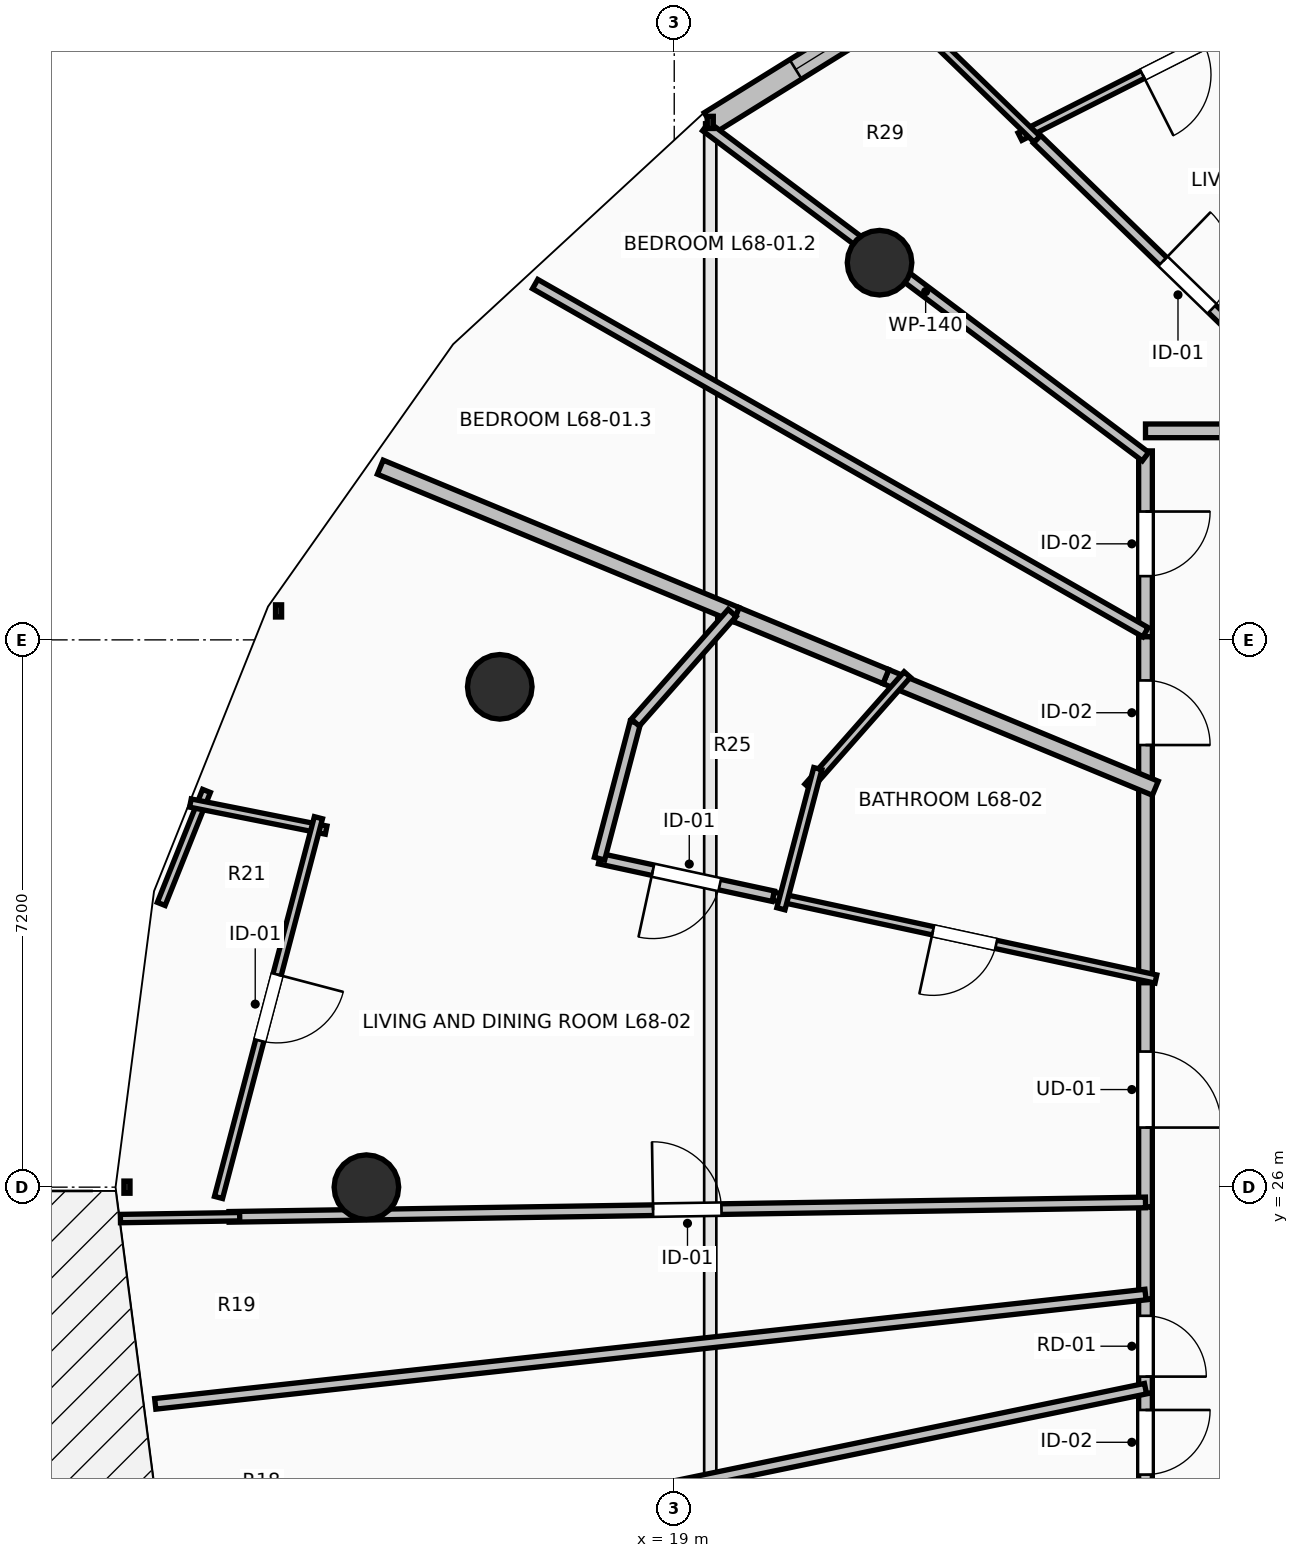
"""IFC4 building model, lengths in metres.
Left out: names, types, materials, properties, quantities, classifications, styles, units other than length and angle.
Written with IfcOpenShell. Run it as: python <this file> out.ifc"""

import sys

from ifc_helpers import new_model, si_unit, direction, frame, frame_2d, origin, origin_2d, place, context, subcontext, project, spatial, rectangle, circle, extrude, element, fill, save


model = new_model("IFC4")
c1 = context("Model", 3, precision=1e-05, world=origin(), true_north=direction((0.0, 1.0)))
c2 = subcontext(c1, "Body", "Model", "MODEL_VIEW")
j1 = project(units=[si_unit("LENGTHUNIT", "METRE"), si_unit("PLANEANGLEUNIT", "RADIAN")], contexts=[c1])
p1 = place(None, origin())
s1 = spatial("IfcSite", under=j1, at=p1, CompositionType="ELEMENT")
p2 = place(p1, origin())
s2 = spatial("IfcBuilding", under=s1, at=p2, CompositionType="ELEMENT")
p3 = place(p2, frame((0.0, 0.0, 252.0)))
s3 = spatial("IfcBuildingStorey", under=s2, at=p3, CompositionType="ELEMENT", Elevation=252.0)
for number, where, z_axis, x_axis in (
    (1, (21.701, 38.162, 0.0), (0.0, 0.0, 1.0), (-0.707, 0.707, 0.0)),
    (2, (16.705, 32.582, 0.0), (0.0, 0.0, 1.0), (-0.924, 0.383, 0.0)),
    (3, (14.95, 26.0, 0.0), (0.0, 0.0, 1.0), (-1.0, 0.0, 0.0)),
):
    element("IfcColumn", number, at=place(p3, frame(where, z_axis=z_axis, x_axis=x_axis)), inside=s3, PredefinedType="COLUMN", context=c2, shape_type="SweptSolid", body=[
        extrude(circle(Radius=0.425, at=origin_2d()), origin(), (0.0, 0.0, 1.0), 3.55),
    ])
p4 = place(p3, frame((23.444, 42.471, 0.0), z_axis=(0.0, 0.0, 1.0), x_axis=(-0.849702323036, -0.527262707032, 0.0)))
e4 = element("IfcWall", 4, at=p4, inside=s3, PredefinedType="STANDARD", context=c2, shape_type="SweptSolid", body=[
    extrude(rectangle(XDim=4.672, YDim=0.3, at=frame_2d((2.336, 0.0))), origin(), (0.0, 0.0, 1.0), 3.29),
])
p5 = place(p4, frame((2.15, 0.0, 0.85)))
e5 = element("IfcOpeningElement", 5, at=p5, cuts=e4, PredefinedType="OPENING", context=c2, shape_type="SweptSolid", body=[
    extrude(rectangle(XDim=1.2, YDim=1.95, at=frame_2d((0.6, 0.975))), frame((0.0, 0.165, 0.0), z_axis=(0.0, -1.0, 0.0), x_axis=(1.0, 0.0, 0.0)), (0.0, 0.0, 1.0), 0.33),
])
p6 = place(p3, frame((27.646, 35.95, 0.0), z_axis=(0.0, 0.0, 1.0), x_axis=(-1.0, 0.0, 0.0)))
e6 = element("IfcWall", 6, at=p6, inside=s3, PredefinedType="PARTITIONING", context=c2, shape_type="SweptSolid", body=[
    extrude(rectangle(XDim=2.446, YDim=0.18, at=frame_2d((1.223, 0.0))), origin(), (0.0, 0.0, 1.0), 2.482),
])
p7 = place(p3, frame((25.2, 35.686, 0.0), z_axis=(0.0, 0.0, 1.0), x_axis=(0.0, -1.0, 0.0)))
e7 = element("IfcWall", 7, at=p7, inside=s3, PredefinedType="PARTITIONING", context=c2, shape_type="SweptSolid", body=[
    extrude(rectangle(XDim=2.445, YDim=0.18, at=frame_2d((1.223, 0.0))), origin(), (0.0, 0.0, 1.0), 2.482),
])
p8 = place(p7, frame((0.798, 0.0, 0.0)))
e8 = element("IfcOpeningElement", 8, at=p8, cuts=e7, PredefinedType="OPENING", context=c2, shape_type="SweptSolid", body=[
    extrude(rectangle(XDim=0.85, YDim=2.1, at=frame_2d((0.425, 1.05))), frame((0.0, 0.105, 0.0), z_axis=(0.0, -1.0, 0.0), x_axis=(1.0, 0.0, 0.0)), (0.0, 0.0, 1.0), 0.21),
])
p9 = place(p3, frame((25.2, 33.241, 0.0), z_axis=(0.0, 0.0, 1.0), x_axis=(0.0, -1.0, 0.0)))
e9 = element("IfcWall", 9, at=p9, inside=s3, PredefinedType="PARTITIONING", context=c2, shape_type="SweptSolid", body=[
    extrude(rectangle(XDim=1.999, YDim=0.18, at=frame_2d((1.0, 0.0))), origin(), (0.0, 0.0, 1.0), 3.022),
])
p10 = place(p9, frame((0.574, 0.0, 0.0)))
e10 = element("IfcOpeningElement", 10, at=p10, cuts=e9, PredefinedType="OPENING", context=c2, shape_type="SweptSolid", body=[
    extrude(rectangle(XDim=0.85, YDim=2.1, at=frame_2d((0.425, 1.05))), frame((0.0, 0.105, 0.0), z_axis=(0.0, -1.0, 0.0), x_axis=(1.0, 0.0, 0.0)), (0.0, 0.0, 1.0), 0.21),
])
p11 = place(p3, frame((25.2, 28.829, 0.0), z_axis=(0.0, 0.0, 1.0), x_axis=(0.0, -1.0, 0.0)))
e11 = element("IfcWall", 11, at=p11, inside=s3, PredefinedType="PARTITIONING", context=c2, shape_type="SweptSolid", body=[
    extrude(rectangle(XDim=3.09, YDim=0.18, at=frame_2d((1.545, 0.0))), origin(), (0.0, 0.0, 1.0), 2.482),
])
p12 = place(p11, frame((1.045, 0.0, 0.0)))
e12 = element("IfcOpeningElement", 12, at=p12, cuts=e11, PredefinedType="OPENING", context=c2, shape_type="SweptSolid", body=[
    extrude(rectangle(XDim=1.0, YDim=2.15, at=frame_2d((0.5, 1.075))), frame((0.0, 0.105, 0.0), z_axis=(0.0, -1.0, 0.0), x_axis=(1.0, 0.0, 0.0)), (0.0, 0.0, 1.0), 0.21),
])
p13 = place(p3, frame((25.2, 31.382, 0.0), z_axis=(0.0, 0.0, 1.0), x_axis=(0.0, -1.0, 0.0)))
e13 = element("IfcWall", 13, at=p13, inside=s3, PredefinedType="PARTITIONING", context=c2, shape_type="SweptSolid", body=[
    extrude(rectangle(XDim=2.693, YDim=0.18, at=frame_2d((1.347, 0.0))), origin(), (0.0, 0.0, 1.0), 2.482),
])
p14 = place(p3, frame((25.2, 25.739, 0.0), z_axis=(0.0, 0.0, 1.0), x_axis=(0.0, -1.0, 0.0)))
e14 = element("IfcWall", 14, at=p14, inside=s3, PredefinedType="PARTITIONING", context=c2, shape_type="SweptSolid", body=[
    extrude(rectangle(XDim=1.212, YDim=0.18, at=frame_2d((0.606, 0.0))), origin(), (0.0, 0.0, 1.0), 3.29),
])
p15 = place(p3, frame((25.2, 24.527, 0.0), z_axis=(0.0, 0.0, 1.0), x_axis=(0.0, -1.0, 0.0)))
e15 = element("IfcWall", 15, at=p15, inside=s3, PredefinedType="PARTITIONING", context=c2, shape_type="SweptSolid", body=[
    extrude(rectangle(XDim=1.239, YDim=0.18, at=frame_2d((0.62, 0.0))), origin(), (0.0, 0.0, 1.0), 3.29),
])
p16 = place(p15, frame((0.219, 0.0, 0.0)))
e16 = element("IfcOpeningElement", 16, at=p16, cuts=e15, PredefinedType="OPENING", context=c2, shape_type="SweptSolid", body=[
    extrude(rectangle(XDim=0.8, YDim=2.05, at=frame_2d((0.4, 1.025))), frame((0.0, 0.105, 0.0), z_axis=(0.0, -1.0, 0.0), x_axis=(1.0, 0.0, 0.0)), (0.0, 0.0, 1.0), 0.21),
])
p17 = place(p3, frame((25.2, 23.288, 0.0), z_axis=(0.0, 0.0, 1.0), x_axis=(0.0, -1.0, 0.0)))
e17 = element("IfcWall", 17, at=p17, inside=s3, PredefinedType="PARTITIONING", context=c2, shape_type="SweptSolid", body=[
    extrude(rectangle(XDim=1.289, YDim=0.18, at=frame_2d((0.645, 0.0))), origin(), (0.0, 0.0, 1.0), 3.29),
])
p18 = place(p17, frame((0.219, 0.0, 0.0)))
e18 = element("IfcOpeningElement", 18, at=p18, cuts=e17, PredefinedType="OPENING", context=c2, shape_type="SweptSolid", body=[
    extrude(rectangle(XDim=0.85, YDim=2.1, at=frame_2d((0.425, 1.05))), frame((0.0, 0.105, 0.0), z_axis=(0.0, -1.0, 0.0), x_axis=(1.0, 0.0, 0.0)), (0.0, 0.0, 1.0), 0.21),
])
p19 = place(p3, frame((27.579, 41.858, 0.0), z_axis=(0.0, 0.0, 1.0), x_axis=(-0.892472689139, -0.451101428883, 0.0)))
e19 = element("IfcWall", 19, at=p19, inside=s3, PredefinedType="PARTITIONING", context=c2, shape_type="SweptSolid", body=[
    extrude(rectangle(XDim=4.516, YDim=0.11, at=frame_2d((2.258, 0.0))), origin(), (0.0, 0.0, 1.0), 3.29),
])
p20 = place(p19, frame((1.808, 0.0, 0.0)))
e20 = element("IfcOpeningElement", 20, at=p20, cuts=e19, PredefinedType="OPENING", context=c2, shape_type="SweptSolid", body=[
    extrude(rectangle(XDim=0.9, YDim=2.1, at=frame_2d((0.45, 1.05))), frame((0.0, 0.07, 0.0), z_axis=(0.0, -1.0, 0.0), x_axis=(1.0, 0.0, 0.0)), (0.0, 0.0, 1.0), 0.14),
])
p21 = place(p3, frame((23.773, 39.787, 0.0), z_axis=(0.0, 0.0, 1.0), x_axis=(-0.718131661866, 0.695907261225, 0.0)))
e21 = element("IfcWall", 21, at=p21, inside=s3, PredefinedType="PARTITIONING", context=c2, shape_type="SweptSolid", body=[
    extrude(rectangle(XDim=2.669, YDim=0.11, at=frame_2d((1.335, 0.0))), origin(), (0.0, 0.0, 1.0), 3.29),
])
p22 = place(p3, frame((23.773, 39.787, 0.0), z_axis=(0.0, 0.0, 1.0), x_axis=(0.718070058765, -0.695970826045, 0.0)))
e22 = element("IfcWall", 22, at=p22, inside=s3, PredefinedType="PARTITIONING", context=c2, shape_type="SweptSolid", body=[
    extrude(rectangle(XDim=5.513, YDim=0.14, at=frame_2d((2.756, 0.0))), origin(), (0.0, 0.0, 1.0), 2.482),
])
p23 = place(p22, frame((2.306, 0.0, 0.0)))
e23 = element("IfcOpeningElement", 23, at=p23, cuts=e22, PredefinedType="OPENING", context=c2, shape_type="SweptSolid", body=[
    extrude(rectangle(XDim=0.9, YDim=2.1, at=frame_2d((0.45, 1.05))), frame((0.0, 0.085, 0.0), z_axis=(0.0, -1.0, 0.0), x_axis=(1.0, 0.0, 0.0)), (0.0, 0.0, 1.0), 0.17),
])
p24 = place(p3, frame((19.415, 39.954, 0.0), z_axis=(0.0, 0.0, 1.0), x_axis=(0.799712355931, -0.600383334022, 0.0)))
e24 = element("IfcWall", 24, at=p24, inside=s3, PredefinedType="PARTITIONING", context=c2, shape_type="SweptSolid", body=[
    extrude(rectangle(XDim=7.234, YDim=0.14, at=frame_2d((3.617, 0.0))), origin(), (0.0, 0.0, 1.0), 2.482),
])
p25 = place(p3, frame((17.17, 37.881, 0.0), z_axis=(0.0, 0.0, 1.0), x_axis=(0.868639415668, -0.495444815844, 0.0)))
e25 = element("IfcWall", 25, at=p25, inside=s3, PredefinedType="PARTITIONING", context=c2, shape_type="SweptSolid", body=[
    extrude(rectangle(XDim=9.244, YDim=0.14, at=frame_2d((4.622, 0.0))), origin(), (0.0, 0.0, 1.0), 2.874),
])
p26 = place(p3, frame((15.133, 35.472, 0.0), z_axis=(0.0, 0.0, 1.0), x_axis=(0.923891232285, -0.382655185392, 0.0)))
e26 = element("IfcWall", 26, at=p26, inside=s3, PredefinedType="PARTITIONING", context=c2, shape_type="SweptSolid", body=[
    extrude(rectangle(XDim=5.07, YDim=0.2, at=frame_2d((2.535, 0.0))), origin(), (0.0, 0.0, 1.0), 2.874),
])
p27 = place(p3, frame((21.785, 32.717, 0.0), z_axis=(0.0, 0.0, 1.0), x_axis=(0.923878783617, -0.382685240352, 0.0)))
e27 = element("IfcWall", 27, at=p27, inside=s3, PredefinedType="PARTITIONING", context=c2, shape_type="SweptSolid", body=[
    extrude(rectangle(XDim=3.837, YDim=0.2, at=frame_2d((1.918, 0.0))), origin(), (0.0, 0.0, 1.0), 2.972),
])
p28 = place(p3, frame((19.817, 33.532, 0.0), z_axis=(0.0, 0.0, 1.0), x_axis=(0.92391905869, -0.382587993786, 0.0)))
e28 = element("IfcWall", 28, at=p28, inside=s3, PredefinedType="PARTITIONING", context=c2, shape_type="SweptSolid", body=[
    extrude(rectangle(XDim=2.13, YDim=0.2, at=frame_2d((1.065, 0.0))), origin(), (0.0, 0.0, 1.0), 2.972),
])
p29 = place(p3, frame((25.337, 28.738, 0.0), z_axis=(0.0, 0.0, 1.0), x_axis=(-0.977382932841, 0.211477191656, 0.0)))
e29 = element("IfcWall", 29, at=p29, inside=s3, PredefinedType="PARTITIONING", context=c2, shape_type="SweptSolid", body=[
    extrude(rectangle(XDim=5.151, YDim=0.11, at=frame_2d((2.576, 0.0))), origin(), (0.0, 0.0, 1.0), 2.482),
])
p30 = place(p29, frame((2.15, 0.0, 0.0)))
e30 = element("IfcOpeningElement", 30, at=p30, cuts=e29, PredefinedType="OPENING", context=c2, shape_type="SweptSolid", body=[
    extrude(rectangle(XDim=0.85, YDim=2.1, at=frame_2d((0.425, 1.05))), frame((0.0, 0.07, 0.0), z_axis=(0.0, -1.0, 0.0), x_axis=(1.0, 0.0, 0.0)), (0.0, 0.0, 1.0), 0.14),
])
p31 = place(p3, frame((12.846, 31.213, 0.0), z_axis=(0.0, 0.0, 1.0), x_axis=(-0.371522095559, -0.928424112414, 0.0)))
e31 = element("IfcWall", 31, at=p31, inside=s3, PredefinedType="PARTITIONING", context=c2, shape_type="SweptSolid", body=[
    extrude(rectangle(XDim=1.602, YDim=0.11, at=frame_2d((0.801, 0.0))), origin(), (0.0, 0.0, 1.0), 3.29),
])
p32 = place(p3, frame((12.635, 31.053, 0.0), z_axis=(0.0, 0.0, 1.0), x_axis=(0.980704252003, -0.195497238094, 0.0)))
e32 = element("IfcWall", 32, at=p32, inside=s3, PredefinedType="PARTITIONING", context=c2, shape_type="SweptSolid", body=[
    extrude(rectangle(XDim=1.821, YDim=0.11, at=frame_2d((0.91, 0.0))), origin(), (0.0, 0.0, 1.0), 3.29),
])
p33 = place(p3, frame((14.319, 30.86, 0.0), z_axis=(0.0, 0.0, 1.0), x_axis=(-0.254404898477, -0.967097796312, 0.0)))
e33 = element("IfcWall", 33, at=p33, inside=s3, PredefinedType="PARTITIONING", context=c2, shape_type="SweptSolid", body=[
    extrude(rectangle(XDim=5.166, YDim=0.11, at=frame_2d((2.583, 0.0))), origin(), (0.0, 0.0, 1.0), 3.29),
])
p34 = place(p33, frame((2.133, 0.0, 0.0)))
e34 = element("IfcOpeningElement", 34, at=p34, cuts=e33, PredefinedType="OPENING", context=c2, shape_type="SweptSolid", body=[
    extrude(rectangle(XDim=0.9, YDim=2.1, at=frame_2d((0.45, 1.05))), frame((0.0, 0.07, 0.0), z_axis=(0.0, -1.0, 0.0), x_axis=(1.0, 0.0, 0.0)), (0.0, 0.0, 1.0), 0.14),
])
p35 = place(p3, frame((20.302, 29.828, 0.0), z_axis=(0.0, 0.0, 1.0), x_axis=(-0.977387924942, 0.211454118377, 0.0)))
e35 = element("IfcWall", 35, at=p35, inside=s3, PredefinedType="PARTITIONING", context=c2, shape_type="SweptSolid", body=[
    extrude(rectangle(XDim=2.338, YDim=0.14, at=frame_2d((1.169, 0.0))), origin(), (0.0, 0.0, 1.0), 2.972),
])
p36 = place(p35, frame((0.719, 0.0, 0.0)))
e36 = element("IfcOpeningElement", 36, at=p36, cuts=e35, PredefinedType="OPENING", context=c2, shape_type="SweptSolid", body=[
    extrude(rectangle(XDim=0.9, YDim=2.1, at=frame_2d((0.45, 1.05))), frame((0.0, 0.085, 0.0), z_axis=(0.0, -1.0, 0.0), x_axis=(1.0, 0.0, 0.0)), (0.0, 0.0, 1.0), 0.17),
])
p37 = place(p3, frame((18.017, 30.322, 0.0), z_axis=(0.0, 0.0, 1.0), x_axis=(0.254434866485, 0.967089912426, 0.0)))
e37 = element("IfcWall", 37, at=p37, inside=s3, PredefinedType="PARTITIONING", context=c2, shape_type="SweptSolid", body=[
    extrude(rectangle(XDim=1.851, YDim=0.14, at=frame_2d((0.926, 0.0))), origin(), (0.0, 0.0, 1.0), 2.482),
])
p38 = place(p3, frame((18.488, 32.112, 0.0), z_axis=(0.0, 0.0, 1.0), x_axis=(0.661856531983, 0.749630529709, 0.0)))
e38 = element("IfcWall", 38, at=p38, inside=s3, PredefinedType="PARTITIONING", context=c2, shape_type="SweptSolid", body=[
    extrude(rectangle(XDim=1.925, YDim=0.14, at=frame_2d((0.962, 0.0))), origin(), (0.0, 0.0, 1.0), 2.482),
])
p39 = place(p3, frame((13.143, 25.609, 0.0), z_axis=(0.0, 0.0, 1.0), x_axis=(0.999875613351, 0.015772058374, 0.0)))
e39 = element("IfcWall", 39, at=p39, inside=s3, PredefinedType="PARTITIONING", context=c2, shape_type="SweptSolid", body=[
    extrude(rectangle(XDim=12.058, YDim=0.14, at=frame_2d((6.029, 0.0))), origin(), (0.0, 0.0, 1.0), 2.874),
])
p40 = place(p39, frame((5.579, 0.0, 0.0)))
e40 = element("IfcOpeningElement", 40, at=p40, cuts=e39, PredefinedType="OPENING", context=c2, shape_type="SweptSolid", body=[
    extrude(rectangle(XDim=0.9, YDim=2.1, at=frame_2d((0.45, 1.05))), frame((0.0, 0.085, 0.0), z_axis=(0.0, -1.0, 0.0), x_axis=(1.0, 0.0, 0.0)), (0.0, 0.0, 1.0), 0.17),
])
p41 = place(p3, frame((22.066, 32.744, 0.0), z_axis=(0.0, 0.0, 1.0), x_axis=(-0.662047420969, -0.749461948593, 0.0)))
e41 = element("IfcWall", 41, at=p41, inside=s3, PredefinedType="PARTITIONING", context=c2, shape_type="SweptSolid", body=[
    extrude(rectangle(XDim=1.972, YDim=0.11, at=frame_2d((0.986, 0.0))), origin(), (0.0, 0.0, 1.0), 2.972),
])
p42 = place(p3, frame((20.889, 31.506, 0.0), z_axis=(0.0, 0.0, 1.0), x_axis=(-0.254568935897, -0.967054629727, 0.0)))
e42 = element("IfcWall", 42, at=p42, inside=s3, PredefinedType="PARTITIONING", context=c2, shape_type="SweptSolid", body=[
    extrude(rectangle(XDim=1.906, YDim=0.11, at=frame_2d((0.953, 0.0))), origin(), (0.0, 0.0, 1.0), 2.482),
])
p43 = place(p3, frame((11.714, 25.587, 0.0), z_axis=(0.0, 0.0, 1.0), x_axis=(0.9998813462, 0.015404334465, 0.0)))
e43 = element("IfcWall", 43, at=p43, inside=s3, PredefinedType="PARTITIONING", context=c2, shape_type="SweptSolid", body=[
    extrude(rectangle(XDim=1.569, YDim=0.11, at=frame_2d((0.785, 0.0))), origin(), (0.0, 0.0, 1.0), 3.29),
])
p44 = place(p3, frame((12.172, 23.149, 0.0), z_axis=(0.0, 0.0, 1.0), x_axis=(0.993963433103, 0.109711866515, 0.0)))
e44 = element("IfcWall", 44, at=p44, inside=s3, PredefinedType="PARTITIONING", context=c2, shape_type="SweptSolid", body=[
    extrude(rectangle(XDim=13.107, YDim=0.14, at=frame_2d((6.553, 0.0))), origin(), (0.0, 0.0, 1.0), 2.874),
])
p45 = place(p3, frame((12.845, 20.791, 0.0), z_axis=(0.0, 0.0, 1.0), x_axis=(0.97923049011, 0.202750208975, 0.0)))
e45 = element("IfcWall", 45, at=p45, inside=s3, PredefinedType="PARTITIONING", context=c2, shape_type="SweptSolid", body=[
    extrude(rectangle(XDim=12.617, YDim=0.14, at=frame_2d((6.309, 0.0))), origin(), (0.0, 0.0, 1.0), 2.874),
])
p46 = place(p5, origin())
e46 = element("IfcWindow", 46, at=p46, inside=s3, PartitioningType="SINGLE_PANEL", PredefinedType="WINDOW", context=c2, shape_type="SweptSolid", body=[
    extrude(rectangle(XDim=1.2, YDim=1.95, at=frame_2d((0.6, 0.975))), frame((0.0, 0.03, 0.0), z_axis=(0.0, -1.0, 0.0), x_axis=(1.0, 0.0, 0.0)), (0.0, 0.0, 1.0), 0.06),
])
fill(e5, e46)
p47 = place(p12, origin())
e47 = element("IfcDoor", 47, at=p47, inside=s3, OperationType="SINGLE_SWING_RIGHT", PredefinedType="DOOR", context=c2, shape_type="SweptSolid", body=[
    extrude(rectangle(XDim=1.0, YDim=2.15, at=frame_2d((0.5, 1.075))), frame((0.0, 0.025, 0.0), z_axis=(0.0, -1.0, 0.0), x_axis=(1.0, 0.0, 0.0)), (0.0, 0.0, 1.0), 0.05),
])
fill(e12, e47)
p48 = place(p20, origin())
e48 = element("IfcDoor", 48, at=p48, inside=s3, OperationType="SINGLE_SWING_RIGHT", PredefinedType="DOOR", context=c2, shape_type="SweptSolid", body=[
    extrude(rectangle(XDim=0.9, YDim=2.1, at=frame_2d((0.45, 1.05))), frame((0.0, 0.025, 0.0), z_axis=(0.0, -1.0, 0.0), x_axis=(1.0, 0.0, 0.0)), (0.0, 0.0, 1.0), 0.05),
])
fill(e20, e48)
p49 = place(p23, origin())
e49 = element("IfcDoor", 49, at=p49, inside=s3, OperationType="SINGLE_SWING_LEFT", PredefinedType="DOOR", context=c2, shape_type="SweptSolid", body=[
    extrude(rectangle(XDim=0.9, YDim=2.1, at=frame_2d((0.45, 1.05))), frame((0.0, 0.025, 0.0), z_axis=(0.0, -1.0, 0.0), x_axis=(1.0, 0.0, 0.0)), (0.0, 0.0, 1.0), 0.05),
])
fill(e23, e49)
p50 = place(p30, origin())
e50 = element("IfcDoor", 50, at=p50, inside=s3, OperationType="SINGLE_SWING_RIGHT", PredefinedType="DOOR", context=c2, shape_type="SweptSolid", body=[
    extrude(rectangle(XDim=0.85, YDim=2.1, at=frame_2d((0.425, 1.05))), frame((0.0, 0.025, 0.0), z_axis=(0.0, -1.0, 0.0), x_axis=(1.0, 0.0, 0.0)), (0.0, 0.0, 1.0), 0.05),
])
fill(e30, e50)
p51 = place(p34, origin())
e51 = element("IfcDoor", 51, at=p51, inside=s3, OperationType="SINGLE_SWING_LEFT", PredefinedType="DOOR", context=c2, shape_type="SweptSolid", body=[
    extrude(rectangle(XDim=0.9, YDim=2.1, at=frame_2d((0.45, 1.05))), frame((0.0, 0.025, 0.0), z_axis=(0.0, -1.0, 0.0), x_axis=(1.0, 0.0, 0.0)), (0.0, 0.0, 1.0), 0.05),
])
fill(e34, e51)
p52 = place(p36, origin())
e52 = element("IfcDoor", 52, at=p52, inside=s3, OperationType="SINGLE_SWING_RIGHT", PredefinedType="DOOR", context=c2, shape_type="SweptSolid", body=[
    extrude(rectangle(XDim=0.9, YDim=2.1, at=frame_2d((0.45, 1.05))), frame((0.0, 0.025, 0.0), z_axis=(0.0, -1.0, 0.0), x_axis=(1.0, 0.0, 0.0)), (0.0, 0.0, 1.0), 0.05),
])
fill(e36, e52)
p53 = place(p40, origin())
e53 = element("IfcDoor", 53, at=p53, inside=s3, OperationType="SINGLE_SWING_LEFT", PredefinedType="DOOR", context=c2, shape_type="SweptSolid", body=[
    extrude(rectangle(XDim=0.9, YDim=2.1, at=frame_2d((0.45, 1.05))), frame((0.0, 0.025, 0.0), z_axis=(0.0, -1.0, 0.0), x_axis=(1.0, 0.0, 0.0)), (0.0, 0.0, 1.0), 0.05),
])
fill(e40, e53)
p54 = place(p8, origin())
e54 = element("IfcDoor", 54, at=p54, inside=s3, OperationType="SINGLE_SWING_LEFT", PredefinedType="DOOR", context=c2, shape_type="SweptSolid", body=[
    extrude(rectangle(XDim=0.85, YDim=2.1, at=frame_2d((0.425, 1.05))), frame((0.0, 0.025, 0.0), z_axis=(0.0, -1.0, 0.0), x_axis=(1.0, 0.0, 0.0)), (0.0, 0.0, 1.0), 0.05),
])
fill(e8, e54)
p55 = place(p10, origin())
e55 = element("IfcDoor", 55, at=p55, inside=s3, OperationType="SINGLE_SWING_RIGHT", PredefinedType="DOOR", context=c2, shape_type="SweptSolid", body=[
    extrude(rectangle(XDim=0.85, YDim=2.1, at=frame_2d((0.425, 1.05))), frame((0.0, 0.025, 0.0), z_axis=(0.0, -1.0, 0.0), x_axis=(1.0, 0.0, 0.0)), (0.0, 0.0, 1.0), 0.05),
])
fill(e10, e55)
p56 = place(p16, origin())
e56 = element("IfcDoor", 56, at=p56, inside=s3, OperationType="SINGLE_SWING_RIGHT", PredefinedType="DOOR", context=c2, shape_type="SweptSolid", body=[
    extrude(rectangle(XDim=0.8, YDim=2.05, at=frame_2d((0.4, 1.025))), frame((0.0, 0.025, 0.0), z_axis=(0.0, -1.0, 0.0), x_axis=(1.0, 0.0, 0.0)), (0.0, 0.0, 1.0), 0.05),
])
fill(e16, e56)
p57 = place(p18, origin())
e57 = element("IfcDoor", 57, at=p57, inside=s3, OperationType="SINGLE_SWING_LEFT", PredefinedType="DOOR", context=c2, shape_type="SweptSolid", body=[
    extrude(rectangle(XDim=0.85, YDim=2.1, at=frame_2d((0.425, 1.05))), frame((0.0, 0.025, 0.0), z_axis=(0.0, -1.0, 0.0), x_axis=(1.0, 0.0, 0.0)), (0.0, 0.0, 1.0), 0.05),
])
fill(e18, e57)
save(model, sys.argv[1])
